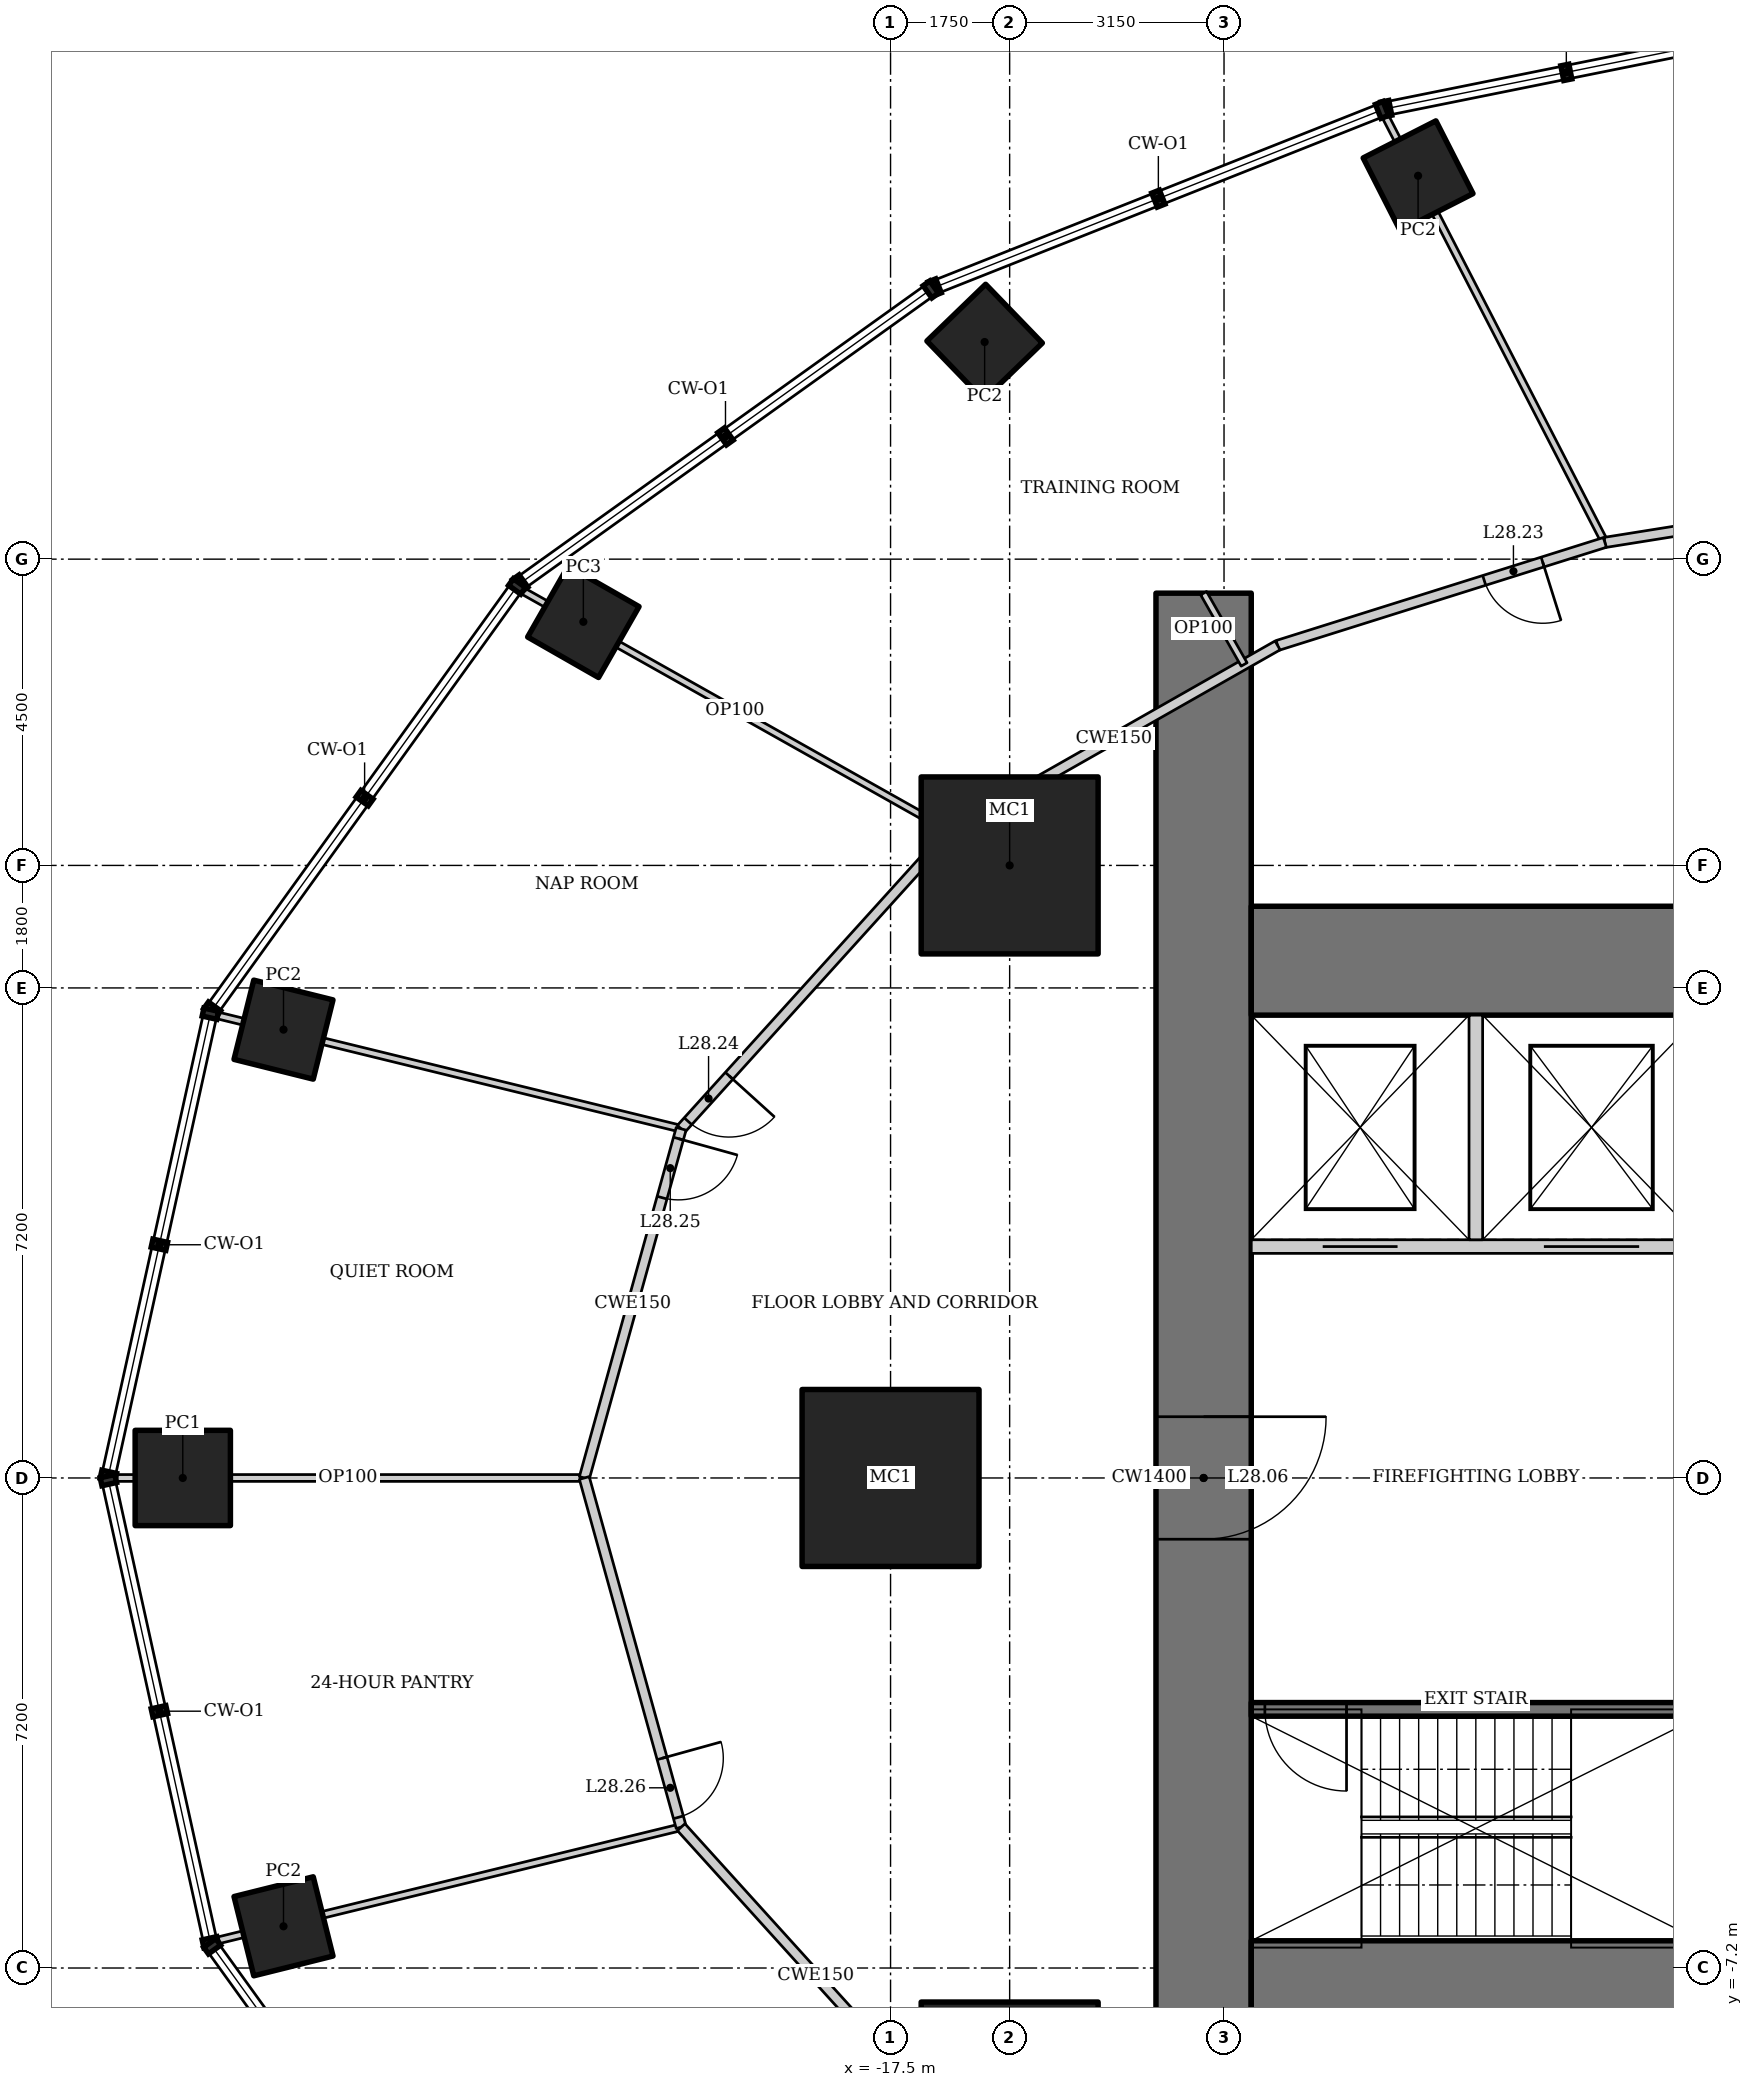
"""IFC4 building model, lengths in metres.
Left out: names, types, materials, properties, quantities, classifications, styles, units other than length and angle.
Written with IfcOpenShell. Run it as: python <this file> out.ifc"""

import sys

from ifc_helpers import new_model, si_unit, direction, frame, frame_2d, origin, origin_2d, place, context, subcontext, project, spatial, rectangle, hollow_rectangle, extrude, element, fill, save


model = new_model("IFC4")
c1 = context("Model", 3, precision=1e-05, world=origin(), true_north=direction((0.0, 1.0)))
c2 = subcontext(c1, "Body", "Model", "MODEL_VIEW")
j1 = project(units=[si_unit("LENGTHUNIT", "METRE"), si_unit("PLANEANGLEUNIT", "RADIAN")], contexts=[c1])
p1 = place(None, origin())
s1 = spatial("IfcSite", under=j1, at=p1, CompositionType="ELEMENT")
p2 = place(p1, origin())
s2 = spatial("IfcBuilding", under=s1, at=p2, CompositionType="ELEMENT")
p3 = place(p2, frame((0.0, 0.0, 121.6)))
s3 = spatial("IfcBuildingStorey", under=s2, at=p3, CompositionType="ELEMENT", Elevation=121.6)
for number, where, z_axis, x_axis in (
    (1, (-15.75, 9.0, 0.0), (0.0, 0.0, 1.0), (1.0, 0.0, 0.0)),
    (2, (-17.5, 0.0, 0.0), (0.0, 0.0, 1.0), (1.0, 0.0, 0.0)),
    (3, (-15.75, -9.0, 0.0), (0.0, 0.0, 1.0), (1.0, 0.0, 0.0)),
):
    element("IfcColumn", number, at=place(p3, frame(where, z_axis=z_axis, x_axis=x_axis)), inside=s3, PredefinedType="COLUMN", context=c2, shape_type="SweptSolid", body=[
        extrude(hollow_rectangle(XDim=2.6, YDim=2.6, WallThickness=0.13, at=origin_2d()), origin(), (0.0, 0.0, 1.0), 4.2),
    ])
for number, where, z_axis, x_axis in (
    (4, (-9.749, 19.133, 0.0), (0.0, 0.0, 1.0), (0.891, 0.454, 0.0)),
    (5, (-16.118, 16.69, 0.0), (0.0, 0.0, 1.0), (0.719, 0.695, 0.0)),
):
    element("IfcColumn", number, at=place(p3, frame(where, z_axis=z_axis, x_axis=x_axis)), inside=s3, PredefinedType="COLUMN", context=c2, shape_type="SweptSolid", body=[
        extrude(hollow_rectangle(XDim=1.2, YDim=1.2, WallThickness=0.1, at=origin_2d()), origin(), (0.0, 0.0, 1.0), 4.2),
    ])
p4 = place(p3, frame((-22.014, 12.579, 0.0), z_axis=(0.0, 0.0, 1.0), x_axis=(0.496139221777, 0.86824298017, 0.0)))
e6 = element("IfcColumn", 6, at=p4, inside=s3, PredefinedType="COLUMN", context=c2, shape_type="SweptSolid", body=[
    extrude(hollow_rectangle(XDim=1.2, YDim=1.2, WallThickness=0.12, at=origin_2d()), origin(), (0.0, 0.0, 1.0), 4.2),
])
p5 = place(p3, frame((-26.42, 6.587, 0.0), z_axis=(0.0, 0.0, 1.0), x_axis=(0.2419218956, 0.970295726276, 0.0)))
e7 = element("IfcColumn", 7, at=p5, inside=s3, PredefinedType="COLUMN", context=c2, shape_type="SweptSolid", body=[
    extrude(hollow_rectangle(XDim=1.2, YDim=1.2, WallThickness=0.1, at=origin_2d()), origin(), (0.0, 0.0, 1.0), 4.2),
])
p6 = place(p3, frame((-27.9, 0.0, 0.0), z_axis=(0.0, 0.0, 1.0), x_axis=(1.0, 0.0, 0.0)))
e8 = element("IfcColumn", 8, at=p6, inside=s3, PredefinedType="COLUMN", context=c2, shape_type="SweptSolid", body=[
    extrude(hollow_rectangle(XDim=1.4, YDim=1.4, WallThickness=0.1, at=origin_2d()), origin(), (0.0, 0.0, 1.0), 4.2),
])
p7 = place(p3, frame((-26.42, -6.587, 0.0), z_axis=(0.0, 0.0, 1.0), x_axis=(0.970295726276, 0.2419218956, 0.0)))
e9 = element("IfcColumn", 9, at=p7, inside=s3, PredefinedType="COLUMN", context=c2, shape_type="SweptSolid", body=[
    extrude(hollow_rectangle(XDim=1.2, YDim=1.2, WallThickness=0.1, at=origin_2d()), origin(), (0.0, 0.0, 1.0), 4.2),
])
p8 = place(p3, frame((-12.9, 13.0, 0.0), z_axis=(0.0, 0.0, 1.0), x_axis=(0.0, -1.0, 0.0)))
e10 = element("IfcWall", 10, at=p8, inside=s3, PredefinedType="SHEAR", context=c2, shape_type="SweptSolid", body=[
    extrude(rectangle(XDim=26.0, YDim=1.4, at=frame_2d((13.0, 0.0))), origin(), (0.0, 0.0, 1.0), 4.2),
])
p9 = place(p8, frame((12.1, 0.0, 0.0)))
e11 = element("IfcOpeningElement", 11, at=p9, cuts=e10, PredefinedType="OPENING", context=c2, shape_type="SweptSolid", body=[
    extrude(rectangle(XDim=1.8, YDim=2.1, at=frame_2d((0.9, 1.05))), frame((0.0, 0.71, 0.0), z_axis=(0.0, -1.0, 0.0), x_axis=(1.0, 0.0, 0.0)), (0.0, 0.0, 1.0), 1.42),
])
for number, where, z_axis, x_axis in (
    (12, (-12.2, -7.6, 0.0), (0.0, 0.0, 1.0), (1.0, 0.0, 0.0)),
    (13, (12.2, 7.6, 0.0), (0.0, 0.0, 1.0), (-1.0, 0.0, 0.0)),
):
    element("IfcWall", number, at=place(p3, frame(where, z_axis=z_axis, x_axis=x_axis)), inside=s3, PredefinedType="SHEAR", context=c2, shape_type="SweptSolid", body=[
        extrude(rectangle(XDim=24.4, YDim=1.6, at=frame_2d((12.2, 0.0))), origin(), (0.0, 0.0, 1.0), 4.2),
    ])
p10 = place(p3, frame((-5.6, -3.4, 0.0), z_axis=(0.0, 0.0, 1.0), x_axis=(-1.0, 0.0, 0.0)))
e14 = element("IfcWall", 14, at=p10, inside=s3, PredefinedType="SHEAR", context=c2, shape_type="SweptSolid", body=[
    extrude(rectangle(XDim=6.6, YDim=0.2, at=frame_2d((3.3, 0.0))), origin(), (0.0, 0.0, 1.0), 4.2),
])
p11 = place(p10, frame((5.2, 0.0, 0.0)))
e15 = element("IfcOpeningElement", 15, at=p11, cuts=e14, PredefinedType="OPENING", context=c2, shape_type="SweptSolid", body=[
    extrude(rectangle(XDim=1.2, YDim=2.1, at=frame_2d((0.6, 1.05))), frame((0.0, 0.11, 0.0), z_axis=(0.0, -1.0, 0.0), x_axis=(1.0, 0.0, 0.0)), (0.0, 0.0, 1.0), 0.22),
])
p12 = place(p3, frame((-12.2, 3.4, 0.0), z_axis=(0.0, 0.0, 1.0), x_axis=(1.0, 0.0, 0.0)))
e16 = element("IfcWall", 16, at=p12, inside=s3, PredefinedType="SOLIDWALL", context=c2, shape_type="SweptSolid", body=[
    extrude(rectangle(XDim=6.6, YDim=0.2, at=frame_2d((3.3, 0.0))), origin(), (0.0, 0.0, 1.0), 4.2),
])
p13 = place(p12, frame((1.05, 0.0, 0.0)))
e17 = element("IfcOpeningElement", 17, at=p13, cuts=e16, PredefinedType="OPENING", context=c2, shape_type="SweptSolid", body=[
    extrude(rectangle(XDim=1.1, YDim=2.2, at=frame_2d((0.55, 1.1))), frame((0.0, 0.11, 0.0), z_axis=(0.0, -1.0, 0.0), x_axis=(1.0, 0.0, 0.0)), (0.0, 0.0, 1.0), 0.22),
])
p14 = place(p12, frame((4.3, 0.0, 0.0)))
e18 = element("IfcOpeningElement", 18, at=p14, cuts=e16, PredefinedType="OPENING", context=c2, shape_type="SweptSolid", body=[
    extrude(rectangle(XDim=1.4, YDim=2.2, at=frame_2d((0.7, 1.1))), frame((0.0, 0.11, 0.0), z_axis=(0.0, -1.0, 0.0), x_axis=(1.0, 0.0, 0.0)), (0.0, 0.0, 1.0), 0.22),
])
p15 = place(p3, frame((-8.9, 3.5, 0.0), z_axis=(0.0, 0.0, 1.0), x_axis=(0.0, 1.0, 0.0)))
e19 = element("IfcWall", 19, at=p15, inside=s3, PredefinedType="SOLIDWALL", context=c2, shape_type="SweptSolid", body=[
    extrude(rectangle(XDim=3.3, YDim=0.2, at=frame_2d((1.65, 0.0))), origin(), (0.0, 0.0, 1.0), 4.2),
])
p16 = place(p3, frame((-10.253, 20.052, 0.0), z_axis=(0.0, 0.0, 1.0), x_axis=(0.458082677592, -0.888909590729, 0.0)))
e20 = element("IfcWall", 20, at=p16, inside=s3, PredefinedType="PARTITIONING", context=c2, shape_type="SweptSolid", body=[
    extrude(rectangle(XDim=7.094, YDim=0.1, at=frame_2d((3.547, 0.0))), origin(), (0.0, 0.0, 1.0), 3.349),
])
p17 = place(p3, frame((-22.949, 13.059, 0.0), z_axis=(0.0, 0.0, 1.0), x_axis=(0.871483913002, -0.490424091352, 0.0)))
e21 = element("IfcWall", 21, at=p17, inside=s3, PredefinedType="PARTITIONING", context=c2, shape_type="SweptSolid", body=[
    extrude(rectangle(XDim=7.26, YDim=0.1, at=frame_2d((3.63, 0.0))), origin(), (0.0, 0.0, 1.0), 3.45),
])
p18 = place(p3, frame((-27.441, 6.809, 0.0), z_axis=(0.0, 0.0, 1.0), x_axis=(0.971377572955, -0.237540755996, 0.0)))
e22 = element("IfcWall", 22, at=p18, inside=s3, PredefinedType="PARTITIONING", context=c2, shape_type="SweptSolid", body=[
    extrude(rectangle(XDim=7.066, YDim=0.1, at=frame_2d((3.533, 0.0))), origin(), (0.0, 0.0, 1.0), 3.113),
])
p19 = place(p3, frame((-28.944, 0.0, 0.0), z_axis=(0.0, 0.0, 1.0), x_axis=(1.0, 0.0, 0.0)))
e23 = element("IfcWall", 23, at=p19, inside=s3, PredefinedType="PARTITIONING", context=c2, shape_type="SweptSolid", body=[
    extrude(rectangle(XDim=6.944, YDim=0.1, at=frame_2d((3.472, 0.0))), origin(), (0.0, 0.0, 1.0), 3.204),
])
p20 = place(p3, frame((-27.441, -6.809, 0.0), z_axis=(0.0, 0.0, 1.0), x_axis=(0.971377572955, 0.237540755996, 0.0)))
e24 = element("IfcWall", 24, at=p20, inside=s3, PredefinedType="PARTITIONING", context=c2, shape_type="SweptSolid", body=[
    extrude(rectangle(XDim=7.066, YDim=0.1, at=frame_2d((3.533, 0.0))), origin(), (0.0, 0.0, 1.0), 3.113),
])
p21 = place(p3, frame((-3.31, 14.335, 0.0), z_axis=(0.0, 0.0, 1.0), x_axis=(-0.987511396594, -0.157547585181, 0.0)))
e25 = element("IfcWall", 25, at=p21, inside=s3, PredefinedType="PARTITIONING", context=c2, shape_type="SweptSolid", body=[
    extrude(rectangle(XDim=3.741, YDim=0.15, at=frame_2d((1.87, 0.0))), origin(), (0.0, 0.0, 1.0), 4.05),
])
p22 = place(p3, frame((-7.004, 13.746, 0.0), z_axis=(0.0, 0.0, 1.0), x_axis=(-0.953893934057, -0.300143903101, 0.0)))
e26 = element("IfcWall", 26, at=p22, inside=s3, PredefinedType="PARTITIONING", context=c2, shape_type="SweptSolid", body=[
    extrude(rectangle(XDim=5.042, YDim=0.15, at=frame_2d((2.521, 0.0))), origin(), (0.0, 0.0, 1.0), 4.05),
])
p23 = place(p22, frame((0.959, 0.0, 0.0)))
e27 = element("IfcOpeningElement", 27, at=p23, cuts=e26, PredefinedType="OPENING", context=c2, shape_type="SweptSolid", body=[
    extrude(rectangle(XDim=0.9, YDim=2.1, at=frame_2d((0.45, 1.05))), frame((0.0, 0.085, 0.0), z_axis=(0.0, -1.0, 0.0), x_axis=(1.0, 0.0, 0.0)), (0.0, 0.0, 1.0), 0.17),
])
p24 = place(p3, frame((-11.813, 12.232, 0.0), z_axis=(0.0, 0.0, 1.0), x_axis=(-0.869375991036, -0.494151177485, 0.0)))
e28 = element("IfcWall", 28, at=p24, inside=s3, PredefinedType="PARTITIONING", context=c2, shape_type="SweptSolid", body=[
    extrude(rectangle(XDim=5.532, YDim=0.15, at=frame_2d((2.766, 0.0))), origin(), (0.0, 0.0, 1.0), 4.05),
])
p25 = place(p3, frame((-16.623, 9.499, 0.0), z_axis=(0.0, 0.0, 1.0), x_axis=(-0.671118353743, -0.741350224435, 0.0)))
e29 = element("IfcWall", 29, at=p25, inside=s3, PredefinedType="PARTITIONING", context=c2, shape_type="SweptSolid", body=[
    extrude(rectangle(XDim=5.892, YDim=0.15, at=frame_2d((2.946, 0.0))), origin(), (0.0, 0.0, 1.0), 4.05),
])
p26 = place(p25, frame((4.842, 0.0, 0.0)))
e30 = element("IfcOpeningElement", 30, at=p26, cuts=e29, PredefinedType="OPENING", context=c2, shape_type="SweptSolid", body=[
    extrude(rectangle(XDim=0.9, YDim=2.1, at=frame_2d((0.45, 1.05))), frame((0.0, 0.085, 0.0), z_axis=(0.0, -1.0, 0.0), x_axis=(1.0, 0.0, 0.0)), (0.0, 0.0, 1.0), 0.17),
])
p27 = place(p3, frame((-20.577, 5.13, 0.0), z_axis=(0.0, 0.0, 1.0), x_axis=(-0.267293817428, -0.963615076244, 0.0)))
e31 = element("IfcWall", 31, at=p27, inside=s3, PredefinedType="PARTITIONING", context=c2, shape_type="SweptSolid", body=[
    extrude(rectangle(XDim=5.324, YDim=0.15, at=frame_2d((2.662, 0.0))), origin(), (0.0, 0.0, 1.0), 4.05),
])
p28 = place(p27, frame((0.15, 0.0, 0.0)))
e32 = element("IfcOpeningElement", 32, at=p28, cuts=e31, PredefinedType="OPENING", context=c2, shape_type="SweptSolid", body=[
    extrude(rectangle(XDim=0.9, YDim=2.1, at=frame_2d((0.45, 1.05))), frame((0.0, 0.085, 0.0), z_axis=(0.0, -1.0, 0.0), x_axis=(1.0, 0.0, 0.0)), (0.0, 0.0, 1.0), 0.17),
])
p29 = place(p3, frame((-22.0, 0.0, 0.0), z_axis=(0.0, 0.0, 1.0), x_axis=(0.267293817428, -0.963615076244, 0.0)))
e33 = element("IfcWall", 33, at=p29, inside=s3, PredefinedType="PARTITIONING", context=c2, shape_type="SweptSolid", body=[
    extrude(rectangle(XDim=5.324, YDim=0.15, at=frame_2d((2.662, 0.0))), origin(), (0.0, 0.0, 1.0), 4.05),
])
p30 = place(p29, frame((4.274, 0.0, 0.0)))
e34 = element("IfcOpeningElement", 34, at=p30, cuts=e33, PredefinedType="OPENING", context=c2, shape_type="SweptSolid", body=[
    extrude(rectangle(XDim=0.9, YDim=2.1, at=frame_2d((0.45, 1.05))), frame((0.0, 0.085, 0.0), z_axis=(0.0, -1.0, 0.0), x_axis=(1.0, 0.0, 0.0)), (0.0, 0.0, 1.0), 0.17),
])
p31 = place(p3, frame((-20.577, -5.13, 0.0), z_axis=(0.0, 0.0, 1.0), x_axis=(0.671118353743, -0.741350224435, 0.0)))
e35 = element("IfcWall", 35, at=p31, inside=s3, PredefinedType="PARTITIONING", context=c2, shape_type="SweptSolid", body=[
    extrude(rectangle(XDim=5.892, YDim=0.15, at=frame_2d((2.946, 0.0))), origin(), (0.0, 0.0, 1.0), 4.05),
])
p32 = place(p3, frame((-12.9, 13.0, 0.0), z_axis=(0.0, 0.0, 1.0), x_axis=(0.494173075358, -0.869363543974, 0.0)))
e36 = element("IfcWall", 36, at=p32, inside=s3, PredefinedType="PARTITIONING", context=c2, shape_type="SweptSolid", body=[
    extrude(rectangle(XDim=1.204, YDim=0.1, at=frame_2d((0.602, 0.0))), origin(), (0.0, 0.0, 1.0), 4.05),
])
p33 = place(p11, origin())
e37 = element("IfcDoor", 37, at=p33, inside=s3, OperationType="SINGLE_SWING_RIGHT", PredefinedType="DOOR", context=c2, shape_type="SweptSolid", body=[
    extrude(rectangle(XDim=1.2, YDim=2.1, at=frame_2d((0.6, 1.05))), frame((0.0, 0.025, 0.0), z_axis=(0.0, -1.0, 0.0), x_axis=(1.0, 0.0, 0.0)), (0.0, 0.0, 1.0), 0.05),
])
fill(e15, e37)
p34 = place(p9, origin())
e38 = element("IfcDoor", 38, at=p34, inside=s3, OperationType="DOUBLE_DOOR_DOUBLE_SWING", PredefinedType="DOOR", context=c2, shape_type="SweptSolid", body=[
    extrude(rectangle(XDim=1.8, YDim=2.1, at=frame_2d((0.9, 1.05))), frame((0.0, 0.025, 0.0), z_axis=(0.0, -1.0, 0.0), x_axis=(1.0, 0.0, 0.0)), (0.0, 0.0, 1.0), 0.05),
])
fill(e11, e38)
p35 = place(p13, origin())
e39 = element("IfcDoor", 39, at=p35, inside=s3, OperationType="DOUBLE_DOOR_SLIDING", PredefinedType="DOOR", context=c2, shape_type="SweptSolid", body=[
    extrude(rectangle(XDim=1.1, YDim=2.2, at=frame_2d((0.55, 1.1))), frame((0.0, 0.025, 0.0), z_axis=(0.0, -1.0, 0.0), x_axis=(1.0, 0.0, 0.0)), (0.0, 0.0, 1.0), 0.05),
])
fill(e17, e39)
p36 = place(p14, origin())
e40 = element("IfcDoor", 40, at=p36, inside=s3, OperationType="DOUBLE_DOOR_SLIDING", PredefinedType="DOOR", context=c2, shape_type="SweptSolid", body=[
    extrude(rectangle(XDim=1.4, YDim=2.2, at=frame_2d((0.7, 1.1))), frame((0.0, 0.025, 0.0), z_axis=(0.0, -1.0, 0.0), x_axis=(1.0, 0.0, 0.0)), (0.0, 0.0, 1.0), 0.05),
])
fill(e18, e40)
p37 = place(p23, origin())
e41 = element("IfcDoor", 41, at=p37, inside=s3, OperationType="SINGLE_SWING_LEFT", PredefinedType="DOOR", context=c2, shape_type="SweptSolid", body=[
    extrude(rectangle(XDim=0.9, YDim=2.1, at=frame_2d((0.45, 1.05))), frame((0.0, 0.025, 0.0), z_axis=(0.0, -1.0, 0.0), x_axis=(1.0, 0.0, 0.0)), (0.0, 0.0, 1.0), 0.05),
])
fill(e27, e41)
p38 = place(p26, origin())
e42 = element("IfcDoor", 42, at=p38, inside=s3, OperationType="SINGLE_SWING_LEFT", PredefinedType="DOOR", context=c2, shape_type="SweptSolid", body=[
    extrude(rectangle(XDim=0.9, YDim=2.1, at=frame_2d((0.45, 1.05))), frame((0.0, 0.025, 0.0), z_axis=(0.0, -1.0, 0.0), x_axis=(1.0, 0.0, 0.0)), (0.0, 0.0, 1.0), 0.05),
])
fill(e30, e42)
p39 = place(p28, origin())
e43 = element("IfcDoor", 43, at=p39, inside=s3, OperationType="SINGLE_SWING_LEFT", PredefinedType="DOOR", context=c2, shape_type="SweptSolid", body=[
    extrude(rectangle(XDim=0.9, YDim=2.1, at=frame_2d((0.45, 1.05))), frame((0.0, 0.025, 0.0), z_axis=(0.0, -1.0, 0.0), x_axis=(1.0, 0.0, 0.0)), (0.0, 0.0, 1.0), 0.05),
])
fill(e32, e43)
p40 = place(p30, origin())
e44 = element("IfcDoor", 44, at=p40, inside=s3, OperationType="SINGLE_SWING_LEFT", PredefinedType="DOOR", context=c2, shape_type="SweptSolid", body=[
    extrude(rectangle(XDim=0.9, YDim=2.1, at=frame_2d((0.45, 1.05))), frame((0.0, 0.025, 0.0), z_axis=(0.0, -1.0, 0.0), x_axis=(1.0, 0.0, 0.0)), (0.0, 0.0, 1.0), 0.05),
])
fill(e34, e44)
save(model, sys.argv[1])
